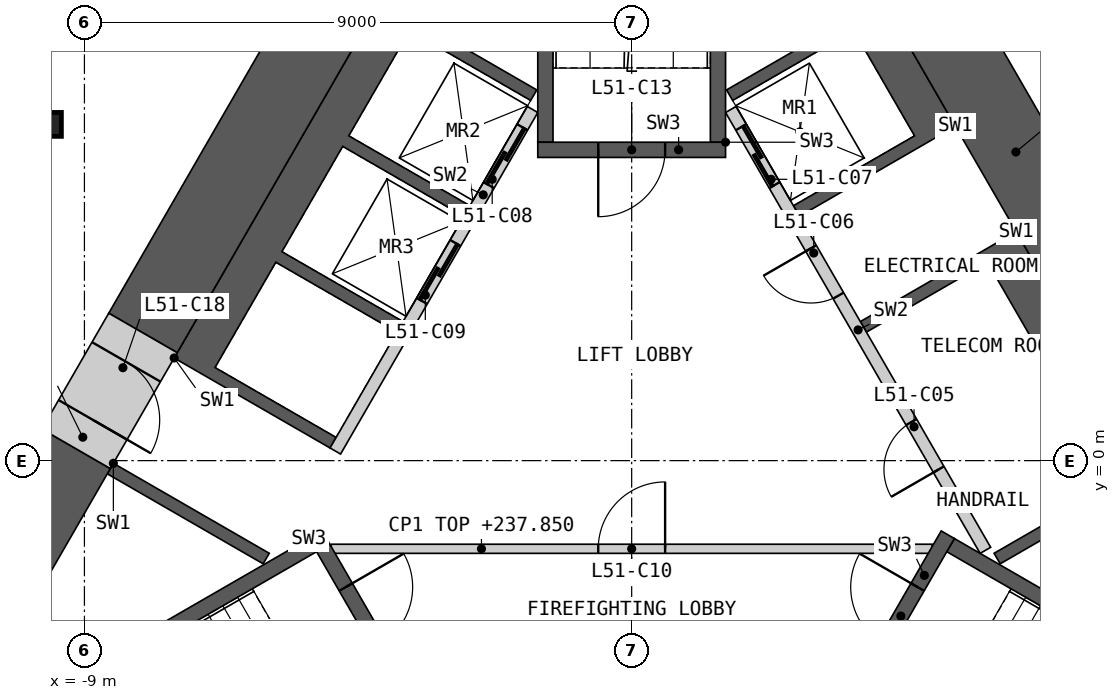
"""IFC4 building model, lengths in metres.
Left out: names, types, materials, properties, quantities, classifications, styles, units other than length and angle.
Written with IfcOpenShell. Run it as: python <this file> out.ifc"""

import sys

from ifc_helpers import new_model, si_unit, direction, frame, frame_2d, origin, origin_2d, place, context, subcontext, project, spatial, polyline, rectangle, i_section, outline, extrude, element, fill, save


model = new_model("IFC4")
c1 = context("Model", 3, precision=1e-05, world=origin(), true_north=direction((0.0, 1.0)))
c2 = subcontext(c1, "Body", "Model", "MODEL_VIEW")
j1 = project(units=[si_unit("LENGTHUNIT", "METRE"), si_unit("PLANEANGLEUNIT", "RADIAN")], contexts=[c1])
p1 = place(None, origin())
s1 = spatial("IfcSite", under=j1, at=p1, CompositionType="ELEMENT")
p2 = place(p1, origin())
s2 = spatial("IfcBuilding", under=s1, at=p2, CompositionType="ELEMENT")
p3 = place(p2, frame((0.0, 0.0, 234.6)))
s3 = spatial("IfcBuildingStorey", under=s2, at=p3, CompositionType="ELEMENT", Elevation=234.6)
p4 = place(p3, frame((-9.578, 5.53, 0.0), z_axis=(0.0, 0.0, 1.0), x_axis=(1.0, 0.0, 0.0)))
e1 = element("IfcColumn", 1, at=p4, inside=s3, PredefinedType="COLUMN", context=c2, shape_type="SweptSolid", body=[
    extrude(i_section(OverallWidth=0.399, OverallDepth=0.393, WebThickness=0.023, FlangeThickness=0.037, at=origin_2d()), origin(), (0.0, 0.0, 1.0), 3.6),
])
p5 = place(p3, origin())
e2 = element("IfcWall", 2, at=p5, inside=s3, PredefinedType="SHEAR", context=c2, shape_type="SweptSolid", body=[
    extrude(outline(polyline([(6.324, 3.767), (8.624, -0.217), (8.231, -0.444), (6.061, -1.697), (5.96, -1.524), (7.952, -0.374), (5.852, 3.263), (3.861, 2.113), (3.76, 2.287), (5.931, 3.54), (6.324, 3.767)])), origin(), (0.0, 0.0, 1.0), 3.25),
])
p6 = place(p3, origin())
e3 = element("IfcWall", 3, at=p6, inside=s3, PredefinedType="SHEAR", context=c2, shape_type="SweptSolid", body=[
    extrude(outline(polyline([(5.324, 5.499), (4.931, 5.272), (2.76, 4.019), (2.66, 4.192), (4.652, 5.342), (3.652, 7.074), (1.66, 5.924), (1.561, 6.097), (3.731, 7.35), (4.124, 7.577), (5.324, 5.499)])), origin(), (0.0, 0.0, 1.0), 3.25),
])
p7 = place(p3, frame((5.817, -1.476, 0.0), z_axis=(0.0, 0.0, 1.0), x_axis=(-0.500002616675, 0.866023893041, 0.0)))
e4 = element("IfcWall", 4, at=p7, inside=s3, PredefinedType="SOLIDWALL", context=c2, shape_type="SweptSolid", body=[
    extrude(rectangle(XDim=8.373, YDim=0.2, at=frame_2d((4.187, 0.0))), origin(), (0.0, 0.0, 1.0), 3.25),
])
p8 = place(p7, frame((1.537, 0.0, 0.0)))
e5 = element("IfcOpeningElement", 5, at=p8, cuts=e4, PredefinedType="OPENING", context=c2, shape_type="SweptSolid", body=[
    extrude(rectangle(XDim=0.9, YDim=2.1, at=frame_2d((0.45, 1.05))), frame((0.0, 0.11, 0.0), z_axis=(0.0, -1.0, 0.0), x_axis=(1.0, 0.0, 0.0)), (0.0, 0.0, 1.0), 0.22),
])
p9 = place(p7, frame((4.837, 0.0, 0.0)))
e6 = element("IfcOpeningElement", 6, at=p9, cuts=e4, PredefinedType="OPENING", context=c2, shape_type="SweptSolid", body=[
    extrude(rectangle(XDim=0.9, YDim=2.1, at=frame_2d((0.45, 1.05))), frame((0.0, 0.11, 0.0), z_axis=(0.0, -1.0, 0.0), x_axis=(1.0, 0.0, 0.0)), (0.0, 0.0, 1.0), 0.22),
])
p10 = place(p7, frame((6.937, 0.0, 0.0)))
e7 = element("IfcOpeningElement", 7, at=p10, cuts=e4, PredefinedType="OPENING", context=c2, shape_type="SweptSolid", body=[
    extrude(rectangle(XDim=1.1, YDim=2.1, at=frame_2d((0.55, 1.05))), frame((0.0, 0.11, 0.0), z_axis=(0.0, -1.0, 0.0), x_axis=(1.0, 0.0, 0.0)), (0.0, 0.0, 1.0), 0.22),
])
p11 = place(p3, origin())
e8 = element("IfcWall", 8, at=p11, inside=s3, PredefinedType="SHEAR", context=c2, shape_type="SweptSolid", body=[
    extrude(outline(polyline([(-7.524, 1.688), (-4.124, 7.577), (-3.731, 7.35), (-1.561, 6.097), (-1.66, 5.924), (-3.652, 7.074), (-4.652, 5.342), (-2.66, 4.192), (-2.76, 4.019), (-4.752, 5.169), (-5.752, 3.437), (-3.76, 2.287), (-3.861, 2.113), (-5.852, 3.263), (-6.852, 1.531), (-4.861, 0.381), (-4.96, 0.208), (-7.131, 1.461), (-7.524, 1.688)])), origin(), (0.0, 0.0, 1.0), 3.25),
])
p12 = place(p3, origin())
e9 = element("IfcWall", 9, at=p12, inside=s3, PredefinedType="SHEAR", context=c2, shape_type="SweptSolid", body=[
    extrude(outline(polyline([(-8.524, -0.044), (-8.131, -0.271), (-5.96, -1.524), (-6.061, -1.697), (-8.231, -0.444), (-8.624, -0.217), (-8.524, -0.044)])), origin(), (0.0, 0.0, 1.0), 3.25),
])
p13 = place(p3, frame((-1.631, 5.776, 0.0), z_axis=(0.0, 0.0, 1.0), x_axis=(-0.499992876559, -0.866029516466, 0.0)))
e10 = element("IfcWall", 10, at=p13, inside=s3, PredefinedType="SOLIDWALL", context=c2, shape_type="SweptSolid", body=[
    extrude(rectangle(XDim=6.486, YDim=0.2, at=frame_2d((3.243, 0.0))), origin(), (0.0, 0.0, 1.0), 3.25),
])
p14 = place(p13, frame((0.337, 0.0, 0.0)))
e11 = element("IfcOpeningElement", 11, at=p14, cuts=e10, PredefinedType="OPENING", context=c2, shape_type="SweptSolid", body=[
    extrude(rectangle(XDim=1.1, YDim=2.1, at=frame_2d((0.55, 1.05))), frame((0.0, 0.11, 0.0), z_axis=(0.0, -1.0, 0.0), x_axis=(1.0, 0.0, 0.0)), (0.0, 0.0, 1.0), 0.22),
])
p15 = place(p13, frame((2.537, 0.0, 0.0)))
e12 = element("IfcOpeningElement", 12, at=p15, cuts=e10, PredefinedType="OPENING", context=c2, shape_type="SweptSolid", body=[
    extrude(rectangle(XDim=1.1, YDim=2.1, at=frame_2d((0.55, 1.05))), frame((0.0, 0.11, 0.0), z_axis=(0.0, -1.0, 0.0), x_axis=(1.0, 0.0, 0.0)), (0.0, 0.0, 1.0), 0.22),
])
p16 = place(p3, frame((-4.941, -1.45, 0.0), z_axis=(0.0, 0.0, 1.0), x_axis=(1.0, 0.0, 0.0)))
e13 = element("IfcWall", 13, at=p16, inside=s3, PredefinedType="PARTITIONING", context=c2, shape_type="SweptSolid", body=[
    extrude(rectangle(XDim=9.882, YDim=0.15, at=frame_2d((4.941, 0.0))), origin(), (0.0, 0.0, 1.0), 3.25),
])
p17 = place(p16, frame((4.391, 0.0, 0.0)))
e14 = element("IfcOpeningElement", 14, at=p17, cuts=e13, PredefinedType="OPENING", context=c2, shape_type="SweptSolid", body=[
    extrude(rectangle(XDim=1.1, YDim=2.1, at=frame_2d((0.55, 1.05))), frame((0.0, 0.085, 0.0), z_axis=(0.0, -1.0, 0.0), x_axis=(1.0, 0.0, 0.0)), (0.0, 0.0, 1.0), 0.17),
])
p18 = place(p3, origin())
e15 = element("IfcWall", 15, at=p18, inside=s3, PredefinedType="SHEAR", context=c2, shape_type="SweptSolid", body=[
    extrude(outline(polyline([(-5.307, -1.281), (-10.374, -4.206), (-10.032, -4.298), (-5.182, -1.498), (-5.307, -1.281)])), origin(), (0.0, 0.0, 1.0), 3.25),
])
p19 = place(p3, frame((-5.199, -1.219, 0.0), z_axis=(0.0, 0.0, 1.0), x_axis=(0.499982516597, -0.866035497597, 0.0)))
e16 = element("IfcWall", 16, at=p19, inside=s3, PredefinedType="SHEAR", context=c2, shape_type="SweptSolid", body=[
    extrude(rectangle(XDim=3.088, YDim=0.25, at=frame_2d((1.544, 0.0))), origin(), (0.0, 0.0, 1.0), 3.25),
])
p20 = place(p19, frame((0.994, 0.0, 0.0)))
e17 = element("IfcOpeningElement", 17, at=p20, cuts=e16, PredefinedType="OPENING", context=c2, shape_type="SweptSolid", body=[
    extrude(rectangle(XDim=1.1, YDim=2.1, at=frame_2d((0.55, 1.05))), frame((0.0, 0.135, 0.0), z_axis=(0.0, -1.0, 0.0), x_axis=(1.0, 0.0, 0.0)), (0.0, 0.0, 1.0), 0.27),
])
p21 = place(p3, origin())
e18 = element("IfcWall", 18, at=p21, inside=s3, PredefinedType="SHEAR", context=c2, shape_type="SweptSolid", body=[
    extrude(outline(polyline([(10.032, -4.298), (10.374, -4.206), (5.307, -1.281), (5.182, -1.498), (10.032, -4.298)])), origin(), (0.0, 0.0, 1.0), 3.25),
])
p22 = place(p3, frame((3.655, -3.893, 0.0), z_axis=(0.0, 0.0, 1.0), x_axis=(0.499982516597, 0.866035497597, 0.0)))
e19 = element("IfcWall", 19, at=p22, inside=s3, PredefinedType="SHEAR", context=c2, shape_type="SweptSolid", body=[
    extrude(rectangle(XDim=3.088, YDim=0.25, at=frame_2d((1.544, 0.0))), origin(), (0.0, 0.0, 1.0), 3.25),
])
p23 = place(p22, frame((0.994, 0.0, 0.0)))
e20 = element("IfcOpeningElement", 20, at=p23, cuts=e19, PredefinedType="OPENING", context=c2, shape_type="SweptSolid", body=[
    extrude(rectangle(XDim=1.1, YDim=2.1, at=frame_2d((0.55, 1.05))), frame((0.0, 0.135, 0.0), z_axis=(0.0, -1.0, 0.0), x_axis=(1.0, 0.0, 0.0)), (0.0, 0.0, 1.0), 0.27),
])
p24 = place(p3, origin())
e21 = element("IfcWall", 21, at=p24, inside=s3, PredefinedType="SHEAR", context=c2, shape_type="SweptSolid", body=[
    extrude(outline(polyline([(1.544, 5.237), (1.544, 11.087), (1.294, 10.837), (1.294, 5.237), (1.544, 5.237)])), origin(), (0.0, 0.0, 1.0), 3.25),
])
p25 = place(p3, origin())
e22 = element("IfcWall", 22, at=p25, inside=s3, PredefinedType="SHEAR", context=c2, shape_type="SweptSolid", body=[
    extrude(outline(polyline([(-1.294, 10.837), (-1.544, 11.087), (-1.544, 5.237), (-1.294, 5.237), (-1.294, 10.837)])), origin(), (0.0, 0.0, 1.0), 3.25),
])
p26 = place(p3, frame((1.544, 5.112, 0.0), z_axis=(0.0, 0.0, 1.0), x_axis=(-1.0, 0.0, 0.0)))
e23 = element("IfcWall", 23, at=p26, inside=s3, PredefinedType="SHEAR", context=c2, shape_type="SweptSolid", body=[
    extrude(rectangle(XDim=3.088, YDim=0.25, at=frame_2d((1.544, 0.0))), origin(), (0.0, 0.0, 1.0), 3.25),
])
p27 = place(p26, frame((0.994, 0.0, 0.0)))
e24 = element("IfcOpeningElement", 24, at=p27, cuts=e23, PredefinedType="OPENING", context=c2, shape_type="SweptSolid", body=[
    extrude(rectangle(XDim=1.1, YDim=2.1, at=frame_2d((0.55, 1.05))), frame((0.0, 0.135, 0.0), z_axis=(0.0, -1.0, 0.0), x_axis=(1.0, 0.0, 0.0)), (0.0, 0.0, 1.0), 0.27),
])
p28 = place(p3, frame((10.081, -1.441, 0.0), z_axis=(0.0, 0.0, 1.0), x_axis=(-0.500012180433, 0.866018371294, 0.0)))
e25 = element("IfcWall", 25, at=p28, inside=s3, PredefinedType="SHEAR", context=c2, shape_type="SweptSolid", body=[
    extrude(rectangle(XDim=15.05, YDim=1.3, at=frame_2d((7.525, 0.0))), origin(), (0.0, 0.0, 1.0), 3.25),
])
p29 = place(p3, frame((-4.636, 7.99, 0.0), z_axis=(0.0, 0.0, 1.0), x_axis=(-0.500022813292, -0.866012232124, 0.0)))
e26 = element("IfcWall", 26, at=p29, inside=s3, PredefinedType="SHEAR", context=c2, shape_type="SweptSolid", body=[
    extrude(rectangle(XDim=6.802, YDim=1.3, at=frame_2d((3.401, 0.0))), origin(), (0.0, 0.0, 1.0), 3.25),
])
p30 = place(p3, frame((-9.137, 0.195, 0.0), z_axis=(0.0, 0.0, 1.0), x_axis=(-0.499985697398, -0.866033661238, 0.0)))
e27 = element("IfcWall", 27, at=p30, inside=s3, PredefinedType="SHEAR", context=c2, shape_type="SweptSolid", body=[
    extrude(rectangle(XDim=4.362, YDim=1.3, at=frame_2d((2.181, 0.0))), origin(), (0.0, 0.0, 1.0), 3.25),
])
p31 = place(p3, frame((-8.037, 2.1, 0.0), z_axis=(0.0, 0.0, 1.0), x_axis=(-0.50002983664, -0.866008176907, 0.0)))
e28 = element("IfcWall", 28, at=p31, inside=s3, PredefinedType="SHEAR", context=c2, shape_type="SweptSolid", body=[
    extrude(rectangle(XDim=2.2, YDim=1.3, at=frame_2d((1.1, 0.0))), origin(), (0.0, 0.0, 1.0), 3.25),
])
p32 = place(p31, frame((0.55, 0.0, 0.0)))
e29 = element("IfcOpeningElement", 29, at=p32, cuts=e28, PredefinedType="OPENING", context=c2, shape_type="SweptSolid", body=[
    extrude(rectangle(XDim=1.1, YDim=2.1, at=frame_2d((0.55, 1.05))), frame((0.0, 0.66, 0.0), z_axis=(0.0, -1.0, 0.0), x_axis=(1.0, 0.0, 0.0)), (0.0, 0.0, 1.0), 1.32),
])
p33 = place(p3, frame((-18.976, -4.747, 0.0), z_axis=(0.0, 0.0, 1.0), x_axis=(0.499999852422, 0.866025488988, 0.0)))
e30 = element("IfcWall", 30, at=p33, inside=s3, PredefinedType="PARTITIONING", context=c2, shape_type="SweptSolid", body=[
    extrude(rectangle(XDim=27.198, YDim=0.2, at=frame_2d((13.599, 0.0))), origin(), (0.0, 0.0, 1.0), 3.25),
])
p34 = place(p33, frame((25.346, 0.0, 0.0)))
e31 = element("IfcOpeningElement", 31, at=p34, cuts=e30, PredefinedType="OPENING", context=c2, shape_type="SweptSolid", body=[
    extrude(rectangle(XDim=1.1, YDim=2.1, at=frame_2d((0.55, 1.05))), frame((0.0, 0.11, 0.0), z_axis=(0.0, -1.0, 0.0), x_axis=(1.0, 0.0, 0.0)), (0.0, 0.0, 1.0), 0.22),
])
p35 = place(p33, frame((16.713, 0.0, 0.0)))
e32 = element("IfcOpeningElement", 32, at=p35, cuts=e30, PredefinedType="OPENING", context=c2, shape_type="SweptSolid", body=[
    extrude(rectangle(XDim=1.1, YDim=2.1, at=frame_2d((0.55, 1.05))), frame((0.0, 0.11, 0.0), z_axis=(0.0, -1.0, 0.0), x_axis=(1.0, 0.0, 0.0)), (0.0, 0.0, 1.0), 0.22),
])
p36 = place(p33, frame((0.35, 0.0, 0.0)))
e33 = element("IfcOpeningElement", 33, at=p36, cuts=e30, PredefinedType="OPENING", context=c2, shape_type="SweptSolid", body=[
    extrude(rectangle(XDim=1.1, YDim=2.1, at=frame_2d((0.55, 1.05))), frame((0.0, 0.11, 0.0), z_axis=(0.0, -1.0, 0.0), x_axis=(1.0, 0.0, 0.0)), (0.0, 0.0, 1.0), 0.22),
])
p37 = place(p3, frame((4.91, 13.616, 0.0), z_axis=(0.0, 0.0, 1.0), x_axis=(0.50000207303, -0.866024206917, 0.0)))
e34 = element("IfcWall", 34, at=p37, inside=s3, PredefinedType="PARTITIONING", context=c2, shape_type="SweptSolid", body=[
    extrude(rectangle(XDim=9.095, YDim=0.2, at=frame_2d((4.547, 0.0))), origin(), (0.0, 0.0, 1.0), 3.25),
])
p38 = place(p8, origin())
e35 = element("IfcDoor", 35, at=p38, inside=s3, OperationType="SINGLE_SWING_LEFT", PredefinedType="DOOR", context=c2, shape_type="SweptSolid", body=[
    extrude(rectangle(XDim=0.9, YDim=2.1, at=frame_2d((0.45, 1.05))), frame((0.0, 0.025, 0.0), z_axis=(0.0, -1.0, 0.0), x_axis=(1.0, 0.0, 0.0)), (0.0, 0.0, 1.0), 0.05),
])
fill(e5, e35)
p39 = place(p9, origin())
e36 = element("IfcDoor", 36, at=p39, inside=s3, OperationType="SINGLE_SWING_RIGHT", PredefinedType="DOOR", context=c2, shape_type="SweptSolid", body=[
    extrude(rectangle(XDim=0.9, YDim=2.1, at=frame_2d((0.45, 1.05))), frame((0.0, 0.025, 0.0), z_axis=(0.0, -1.0, 0.0), x_axis=(1.0, 0.0, 0.0)), (0.0, 0.0, 1.0), 0.05),
])
fill(e6, e36)
p40 = place(p10, origin())
e37 = element("IfcDoor", 37, at=p40, inside=s3, OperationType="SLIDING_TO_LEFT", PredefinedType="DOOR", context=c2, shape_type="SweptSolid", body=[
    extrude(rectangle(XDim=1.1, YDim=2.1, at=frame_2d((0.55, 1.05))), frame((0.0, 0.025, 0.0), z_axis=(0.0, -1.0, 0.0), x_axis=(1.0, 0.0, 0.0)), (0.0, 0.0, 1.0), 0.05),
])
fill(e7, e37)
p41 = place(p14, origin())
e38 = element("IfcDoor", 38, at=p41, inside=s3, OperationType="SLIDING_TO_LEFT", PredefinedType="DOOR", context=c2, shape_type="SweptSolid", body=[
    extrude(rectangle(XDim=1.1, YDim=2.1, at=frame_2d((0.55, 1.05))), frame((0.0, 0.025, 0.0), z_axis=(0.0, -1.0, 0.0), x_axis=(1.0, 0.0, 0.0)), (0.0, 0.0, 1.0), 0.05),
])
fill(e11, e38)
p42 = place(p15, origin())
e39 = element("IfcDoor", 39, at=p42, inside=s3, OperationType="SLIDING_TO_LEFT", PredefinedType="DOOR", context=c2, shape_type="SweptSolid", body=[
    extrude(rectangle(XDim=1.1, YDim=2.1, at=frame_2d((0.55, 1.05))), frame((0.0, 0.025, 0.0), z_axis=(0.0, -1.0, 0.0), x_axis=(1.0, 0.0, 0.0)), (0.0, 0.0, 1.0), 0.05),
])
fill(e12, e39)
p43 = place(p17, origin())
e40 = element("IfcDoor", 40, at=p43, inside=s3, OperationType="SINGLE_SWING_RIGHT", PredefinedType="DOOR", context=c2, shape_type="SweptSolid", body=[
    extrude(rectangle(XDim=1.1, YDim=2.1, at=frame_2d((0.55, 1.05))), frame((0.0, 0.025, 0.0), z_axis=(0.0, -1.0, 0.0), x_axis=(1.0, 0.0, 0.0)), (0.0, 0.0, 1.0), 0.05),
])
fill(e14, e40)
p44 = place(p20, origin())
e41 = element("IfcDoor", 41, at=p44, inside=s3, OperationType="SINGLE_SWING_LEFT", PredefinedType="DOOR", context=c2, shape_type="SweptSolid", body=[
    extrude(rectangle(XDim=1.1, YDim=2.1, at=frame_2d((0.55, 1.05))), frame((0.0, 0.025, 0.0), z_axis=(0.0, -1.0, 0.0), x_axis=(1.0, 0.0, 0.0)), (0.0, 0.0, 1.0), 0.05),
])
fill(e17, e41)
p45 = place(p23, origin())
e42 = element("IfcDoor", 42, at=p45, inside=s3, OperationType="SINGLE_SWING_RIGHT", PredefinedType="DOOR", context=c2, shape_type="SweptSolid", body=[
    extrude(rectangle(XDim=1.1, YDim=2.1, at=frame_2d((0.55, 1.05))), frame((0.0, 0.025, 0.0), z_axis=(0.0, -1.0, 0.0), x_axis=(1.0, 0.0, 0.0)), (0.0, 0.0, 1.0), 0.05),
])
fill(e20, e42)
p46 = place(p27, origin())
e43 = element("IfcDoor", 43, at=p46, inside=s3, OperationType="SINGLE_SWING_RIGHT", PredefinedType="DOOR", context=c2, shape_type="SweptSolid", body=[
    extrude(rectangle(XDim=1.1, YDim=2.1, at=frame_2d((0.55, 1.05))), frame((0.0, 0.025, 0.0), z_axis=(0.0, -1.0, 0.0), x_axis=(1.0, 0.0, 0.0)), (0.0, 0.0, 1.0), 0.05),
])
fill(e24, e43)
p47 = place(p32, origin())
e44 = element("IfcDoor", 44, at=p47, inside=s3, OperationType="SINGLE_SWING_RIGHT", PredefinedType="DOOR", context=c2, shape_type="SweptSolid", body=[
    extrude(rectangle(XDim=1.1, YDim=2.1, at=frame_2d((0.55, 1.05))), frame((0.0, 0.405, 0.0), z_axis=(0.0, -1.0, 0.0), x_axis=(1.0, 0.0, 0.0)), (0.0, 0.0, 1.0), 0.05),
])
fill(e29, e44)
save(model, sys.argv[1])
